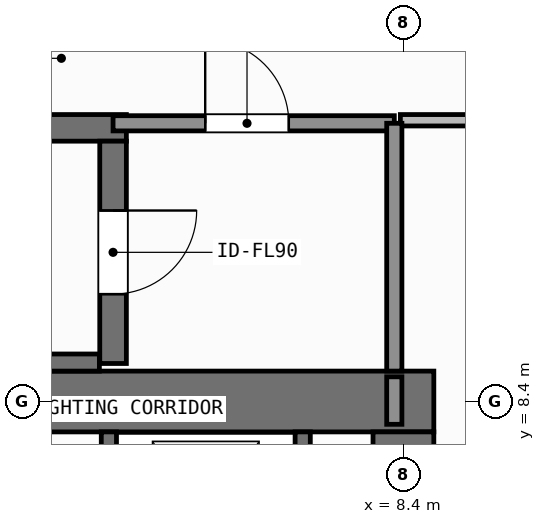
"""IFC4 building model, lengths in metres.
Left out: names, types, materials, properties, quantities, classifications, styles, units other than length and angle.
Written with IfcOpenShell. Run it as: python <this file> out.ifc"""

import sys

from ifc_helpers import new_model, si_unit, direction, frame, frame_2d, origin, place, context, subcontext, project, spatial, rectangle, extrude, element, fill, save


model = new_model("IFC4")
c1 = context("Model", 3, precision=1e-05, world=origin(), true_north=direction((0.0, 1.0)))
c2 = subcontext(c1, "Body", "Model", "MODEL_VIEW")
j1 = project(units=[si_unit("LENGTHUNIT", "METRE"), si_unit("PLANEANGLEUNIT", "RADIAN")], contexts=[c1])
p1 = place(None, origin())
s1 = spatial("IfcSite", under=j1, at=p1, CompositionType="ELEMENT")
p2 = place(p1, origin())
s2 = spatial("IfcBuilding", under=s1, at=p2, CompositionType="ELEMENT")
p3 = place(p2, frame((0.0, 0.0, 164.1)))
s3 = spatial("IfcBuildingStorey", under=s2, at=p3, CompositionType="ELEMENT", Elevation=164.1)
p4 = place(p3, frame((-7.55, 8.4, 0.0), z_axis=(0.0, 0.0, 1.0), x_axis=(1.0, 0.0, 0.0)))
e1 = element("IfcWall", 1, at=p4, inside=s3, PredefinedType="SHEAR", context=c2, shape_type="SweptSolid", body=[
    extrude(rectangle(XDim=16.35, YDim=0.8, at=frame_2d((8.175, 0.0))), origin(), (0.0, 0.0, 1.0), 3.9),
])
p5 = place(p3, frame((8.4, 5.825, 0.0), z_axis=(0.0, 0.0, 1.0), x_axis=(0.0, 1.0, 0.0)))
e2 = element("IfcWall", 2, at=p5, inside=s3, PredefinedType="SHEAR", context=c2, shape_type="SweptSolid", body=[
    extrude(rectangle(XDim=2.175, YDim=0.8, at=frame_2d((1.087, 0.0))), origin(), (0.0, 0.0, 1.0), 3.9),
])
p6 = place(p3, frame((-2.555, 12.0, 0.0), z_axis=(0.0, 0.0, 1.0), x_axis=(1.0, 0.0, 0.0)))
e3 = element("IfcWall", 3, at=p6, inside=s3, PredefinedType="SHEAR", context=c2, shape_type="SweptSolid", body=[
    extrude(rectangle(XDim=7.31, YDim=0.35, at=frame_2d((3.655, 0.0))), origin(), (0.0, 0.0, 1.0), 3.9),
])
p7 = place(p3, frame((-2.2, 8.913, 0.0), z_axis=(0.0, 0.0, 1.0), x_axis=(1.0, 0.0, 0.0)))
e4 = element("IfcWall", 4, at=p7, inside=s3, PredefinedType="SHEAR", context=c2, shape_type="SweptSolid", body=[
    extrude(rectangle(XDim=6.6, YDim=0.225, at=frame_2d((3.3, 0.0))), origin(), (0.0, 0.0, 1.0), 3.9),
])
p8 = place(p3, frame((4.58, 11.825, 0.0), z_axis=(0.0, 0.0, 1.0), x_axis=(0.0, -1.0, 0.0)))
e5 = element("IfcWall", 5, at=p8, inside=s3, PredefinedType="SHEAR", context=c2, shape_type="SweptSolid", body=[
    extrude(rectangle(XDim=2.925, YDim=0.35, at=frame_2d((1.462, 0.0))), origin(), (0.0, 0.0, 1.0), 3.9),
])
p9 = place(p8, frame((0.913, 0.0, 0.0)))
e6 = element("IfcOpeningElement", 6, at=p9, cuts=e5, PredefinedType="OPENING", context=c2, shape_type="SweptSolid", body=[
    extrude(rectangle(XDim=1.1, YDim=2.15, at=frame_2d((0.55, 1.075))), frame((0.0, 0.185, 0.0), z_axis=(0.0, -1.0, 0.0), x_axis=(1.0, 0.0, 0.0)), (0.0, 0.0, 1.0), 0.37),
])
p10 = place(p3, frame((4.525, 5.825, 0.0), z_axis=(0.0, 0.0, 1.0), x_axis=(0.0, 1.0, 0.0)))
e7 = element("IfcWall", 7, at=p10, inside=s3, PredefinedType="SHEAR", context=c2, shape_type="SweptSolid", body=[
    extrude(rectangle(XDim=2.175, YDim=0.2, at=frame_2d((1.087, 0.0))), origin(), (0.0, 0.0, 1.0), 3.62),
])
p11 = place(p10, frame((0.425, 0.0, 0.0)))
e8 = element("IfcOpeningElement", 8, at=p11, cuts=e7, PredefinedType="OPENING", context=c2, shape_type="SweptSolid", body=[
    extrude(rectangle(XDim=1.1, YDim=2.2, at=frame_2d((0.55, 1.1))), frame((0.0, 0.11, 0.0), z_axis=(0.0, -1.0, 0.0), x_axis=(1.0, 0.0, 0.0)), (0.0, 0.0, 1.0), 0.22),
])
p12 = place(p3, frame((7.075, 5.825, 0.0), z_axis=(0.0, 0.0, 1.0), x_axis=(0.0, 1.0, 0.0)))
e9 = element("IfcWall", 9, at=p12, inside=s3, PredefinedType="SHEAR", context=c2, shape_type="SweptSolid", body=[
    extrude(rectangle(XDim=2.175, YDim=0.2, at=frame_2d((1.087, 0.0))), origin(), (0.0, 0.0, 1.0), 3.62),
])
p13 = place(p3, frame((4.58, 12.06, 0.0), z_axis=(0.0, 0.0, 1.0), x_axis=(1.0, 0.0, 0.0)))
e10 = element("IfcWall", 10, at=p13, inside=s3, PredefinedType="SOLIDWALL", context=c2, shape_type="SweptSolid", body=[
    extrude(rectangle(XDim=3.7, YDim=0.2, at=frame_2d((1.85, 0.0))), origin(), (0.0, 0.0, 1.0), 3.62),
])
p14 = place(p13, frame((1.212, 0.0, 0.0)))
e11 = element("IfcOpeningElement", 11, at=p14, cuts=e10, PredefinedType="OPENING", context=c2, shape_type="SweptSolid", body=[
    extrude(rectangle(XDim=1.1, YDim=2.15, at=frame_2d((0.55, 1.075))), frame((0.0, 0.11, 0.0), z_axis=(0.0, -1.0, 0.0), x_axis=(1.0, 0.0, 0.0)), (0.0, 0.0, 1.0), 0.22),
])
p15 = place(p3, frame((8.36, 12.1, 0.0), z_axis=(0.0, 0.0, 1.0), x_axis=(1.0, 0.0, 0.0)))
e12 = element("IfcWall", 12, at=p15, inside=s3, PredefinedType="PARTITIONING", context=c2, shape_type="SweptSolid", body=[
    extrude(rectangle(XDim=7.22, YDim=0.15, at=frame_2d((3.61, 0.0))), origin(), (0.0, 0.0, 1.0), 3.62),
])
p16 = place(p15, frame((3.513, 0.0, 0.0)))
e13 = element("IfcOpeningElement", 13, at=p16, cuts=e12, PredefinedType="OPENING", context=c2, shape_type="SweptSolid", body=[
    extrude(rectangle(XDim=0.9, YDim=2.1, at=frame_2d((0.45, 1.05))), frame((0.0, 0.085, 0.0), z_axis=(0.0, -1.0, 0.0), x_axis=(1.0, 0.0, 0.0)), (0.0, 0.0, 1.0), 0.17),
])
p17 = place(p3, frame((8.28, 8.8, 0.0), z_axis=(0.0, 0.0, 1.0), x_axis=(0.0, 1.0, 0.0)))
e14 = element("IfcWall", 14, at=p17, inside=s3, PredefinedType="SOLIDWALL", context=c2, shape_type="SweptSolid", body=[
    extrude(rectangle(XDim=3.26, YDim=0.2, at=frame_2d((1.63, 0.0))), origin(), (0.0, 0.0, 1.0), 3.62),
])
p18 = place(p3, frame((8.28, 8.1, 0.0), z_axis=(0.0, 0.0, 1.0), x_axis=(0.0, 1.0, 0.0)))
e15 = element("IfcWall", 15, at=p18, inside=s3, PredefinedType="SOLIDWALL", context=c2, shape_type="SweptSolid", body=[
    extrude(rectangle(XDim=0.625, YDim=0.2, at=frame_2d((0.312, 0.0))), origin(), (0.0, 0.0, 1.0), 3.62),
])
p19 = place(p9, origin())
e16 = element("IfcDoor", 16, at=p19, inside=s3, OperationType="SINGLE_SWING_LEFT", PredefinedType="DOOR", context=c2, shape_type="SweptSolid", body=[
    extrude(rectangle(XDim=1.1, YDim=2.15, at=frame_2d((0.55, 1.075))), frame((0.0, 0.025, 0.0), z_axis=(0.0, -1.0, 0.0), x_axis=(1.0, 0.0, 0.0)), (0.0, 0.0, 1.0), 0.05),
])
fill(e6, e16)
p20 = place(p14, origin())
e17 = element("IfcDoor", 17, at=p20, inside=s3, OperationType="SINGLE_SWING_LEFT", PredefinedType="DOOR", context=c2, shape_type="SweptSolid", body=[
    extrude(rectangle(XDim=1.1, YDim=2.15, at=frame_2d((0.55, 1.075))), frame((0.0, 0.025, 0.0), z_axis=(0.0, -1.0, 0.0), x_axis=(1.0, 0.0, 0.0)), (0.0, 0.0, 1.0), 0.05),
])
fill(e11, e17)
save(model, sys.argv[1])
